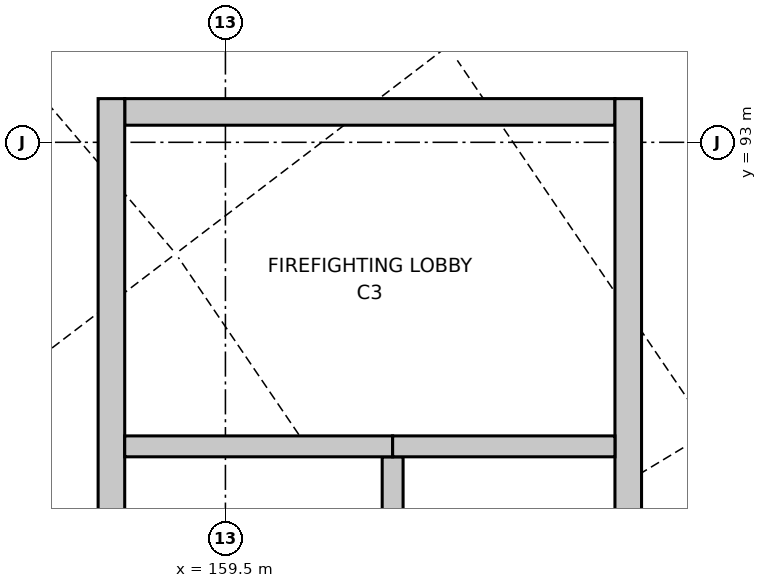
"""IFC4 building model, lengths in metres.
Left out: names, types, materials, properties, quantities, classifications, styles, units other than length and angle.
Written with IfcOpenShell. Run it as: python <this file> out.ifc"""

import sys

from ifc_helpers import new_model, si_unit, direction, frame, frame_2d, origin, place, context, subcontext, project, spatial, rectangle, extrude, element, fill, save


model = new_model("IFC4")
c1 = context("Model", 3, precision=1e-05, world=origin(), true_north=direction((0.0, 1.0)))
c2 = subcontext(c1, "Body", "Model", "MODEL_VIEW")
j1 = project(units=[si_unit("LENGTHUNIT", "METRE"), si_unit("PLANEANGLEUNIT", "RADIAN")], contexts=[c1])
p1 = place(None, origin())
s1 = spatial("IfcSite", under=j1, at=p1, CompositionType="ELEMENT")
p2 = place(p1, origin())
s2 = spatial("IfcBuilding", under=s1, at=p2, CompositionType="ELEMENT")
p3 = place(p2, origin())
s3 = spatial("IfcBuildingStorey", under=s2, at=p3, CompositionType="ELEMENT", Elevation=0.0)
p4 = place(p3, frame((158.175, 93.4, 0.0), z_axis=(0.0, 0.0, 1.0), x_axis=(1.0, 0.0, 0.0)))
e1 = element("IfcWall", 1, at=p4, inside=s3, PredefinedType="SHEAR", context=c2, shape_type="SweptSolid", body=[
    extrude(rectangle(XDim=6.45, YDim=0.35, at=frame_2d((3.225, 0.0))), origin(), (0.0, 0.0, 1.0), 4.52),
])
p5 = place(p4, frame((2.55, 0.0, 0.0)))
e2 = element("IfcOpeningElement", 2, at=p5, cuts=e1, PredefinedType="OPENING", context=c2, shape_type="SweptSolid", body=[
    extrude(rectangle(XDim=1.35, YDim=2.2, at=frame_2d((0.675, 1.1))), frame((0.0, 0.185, 0.0), z_axis=(0.0, -1.0, 0.0), x_axis=(1.0, 0.0, 0.0)), (0.0, 0.0, 1.0), 0.37),
])
for number, where, z_axis, x_axis in (
    (3, (158.0, 81.975, 0.0), (0.0, 0.0, 1.0), (0.0, 1.0, 0.0)),
    (4, (164.8, 81.975, 0.0), (0.0, 0.0, 1.0), (0.0, 1.0, 0.0)),
):
    element("IfcWall", number, at=place(p3, frame(where, z_axis=z_axis, x_axis=x_axis)), inside=s3, PredefinedType="SHEAR", context=c2, shape_type="SweptSolid", body=[
        extrude(rectangle(XDim=11.6, YDim=0.35, at=frame_2d((5.8, 0.0))), origin(), (0.0, 0.0, 1.0), 4.52),
    ])
p6 = place(p3, frame((161.7, 81.975, 0.0), z_axis=(0.0, 0.0, 1.0), x_axis=(0.0, 1.0, 0.0)))
e5 = element("IfcWall", 5, at=p6, inside=s3, PredefinedType="SHEAR", context=c2, shape_type="SweptSolid", body=[
    extrude(rectangle(XDim=6.887, YDim=0.275, at=frame_2d((3.444, 0.0))), origin(), (0.0, 0.0, 1.0), 4.52),
])
p7 = place(p3, frame((158.175, 89.0, 0.0), z_axis=(0.0, 0.0, 1.0), x_axis=(1.0, 0.0, 0.0)))
e6 = element("IfcWall", 6, at=p7, inside=s3, PredefinedType="SHEAR", context=c2, shape_type="SweptSolid", body=[
    extrude(rectangle(XDim=3.525, YDim=0.275, at=frame_2d((1.762, 0.0))), origin(), (0.0, 0.0, 1.0), 4.52),
])
p8 = place(p7, frame((1.785, 0.0, 0.0)))
e7 = element("IfcOpeningElement", 7, at=p8, cuts=e6, PredefinedType="OPENING", context=c2, shape_type="SweptSolid", body=[
    extrude(rectangle(XDim=1.25, YDim=2.15, at=frame_2d((0.625, 1.075))), frame((0.0, 0.147, 0.0), z_axis=(0.0, -1.0, 0.0), x_axis=(1.0, 0.0, 0.0)), (0.0, 0.0, 1.0), 0.295),
])
p9 = place(p3, frame((161.7, 89.0, 0.0), z_axis=(0.0, 0.0, 1.0), x_axis=(1.0, 0.0, 0.0)))
e8 = element("IfcWall", 8, at=p9, inside=s3, PredefinedType="SHEAR", context=c2, shape_type="SweptSolid", body=[
    extrude(rectangle(XDim=2.925, YDim=0.275, at=frame_2d((1.462, 0.0))), origin(), (0.0, 0.0, 1.0), 4.52),
])
p10 = place(p9, frame((0.982, 0.0, 0.0)))
e9 = element("IfcOpeningElement", 9, at=p10, cuts=e8, PredefinedType="OPENING", context=c2, shape_type="SweptSolid", body=[
    extrude(rectangle(XDim=1.1, YDim=2.15, at=frame_2d((0.55, 1.075))), frame((0.0, 0.147, 0.0), z_axis=(0.0, -1.0, 0.0), x_axis=(1.0, 0.0, 0.0)), (0.0, 0.0, 1.0), 0.295),
])
p11 = place(p8, origin())
e10 = element("IfcDoor", 10, at=p11, inside=s3, OperationType="SINGLE_SWING_RIGHT", PredefinedType="DOOR", context=c2, shape_type="SweptSolid", body=[
    extrude(rectangle(XDim=1.25, YDim=2.15, at=frame_2d((0.625, 1.075))), frame((0.0, 0.025, 0.0), z_axis=(0.0, -1.0, 0.0), x_axis=(1.0, 0.0, 0.0)), (0.0, 0.0, 1.0), 0.05),
])
fill(e7, e10)
p12 = place(p10, origin())
e11 = element("IfcDoor", 11, at=p12, inside=s3, OperationType="DOUBLE_DOOR_SLIDING", PredefinedType="DOOR", context=c2, shape_type="SweptSolid", body=[
    extrude(rectangle(XDim=1.1, YDim=2.15, at=frame_2d((0.55, 1.075))), frame((0.0, 0.025, 0.0), z_axis=(0.0, -1.0, 0.0), x_axis=(1.0, 0.0, 0.0)), (0.0, 0.0, 1.0), 0.05),
])
fill(e9, e11)
p13 = place(p5, origin())
e12 = element("IfcDoor", 12, at=p13, inside=s3, OperationType="SINGLE_SWING_RIGHT", PredefinedType="DOOR", context=c2, shape_type="SweptSolid", body=[
    extrude(rectangle(XDim=1.35, YDim=2.2, at=frame_2d((0.675, 1.1))), frame((0.0, 0.025, 0.0), z_axis=(0.0, -1.0, 0.0), x_axis=(1.0, 0.0, 0.0)), (0.0, 0.0, 1.0), 0.05),
])
fill(e2, e12)
save(model, sys.argv[1])
